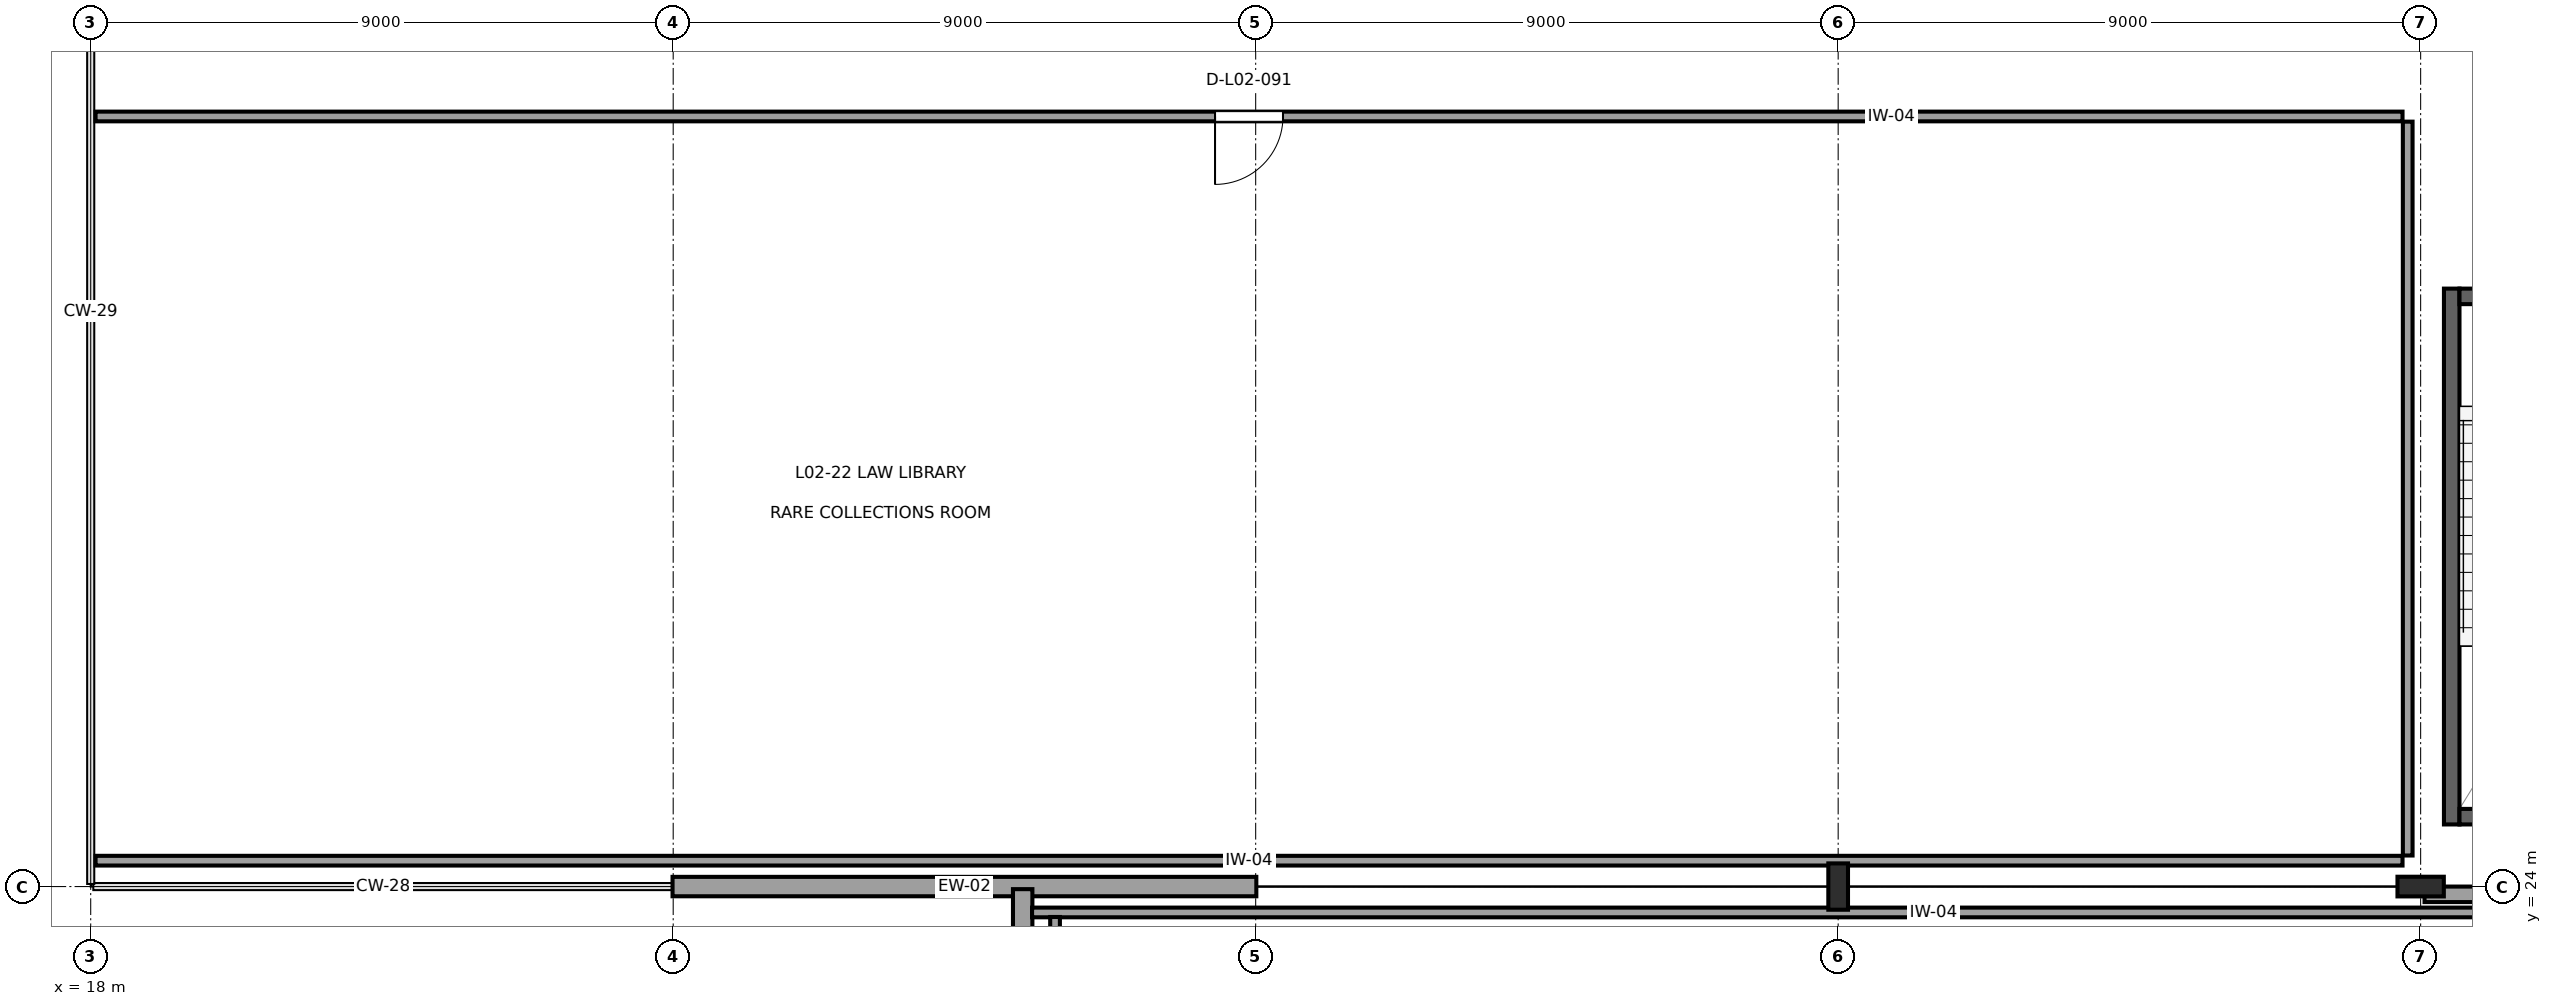
"""IFC4 building model, lengths in metres.
Left out: names, types, materials, properties, quantities, classifications, styles, units other than length and angle.
Written with IfcOpenShell. Run it as: python <this file> out.ifc"""

import sys

from ifc_helpers import new_model, si_unit, direction, frame, frame_2d, origin, origin_2d, place, context, subcontext, project, spatial, rectangle, i_section, extrude, element, fill, save


model = new_model("IFC4")
c1 = context("Model", 3, precision=1e-05, world=origin(), true_north=direction((0.0, 1.0)))
c2 = subcontext(c1, "Body", "Model", "MODEL_VIEW")
j1 = project(units=[si_unit("LENGTHUNIT", "METRE"), si_unit("PLANEANGLEUNIT", "RADIAN")], contexts=[c1])
p1 = place(None, origin())
s1 = spatial("IfcSite", under=j1, at=p1, CompositionType="ELEMENT")
p2 = place(p1, origin())
s2 = spatial("IfcBuilding", under=s1, at=p2, CompositionType="ELEMENT")
p3 = place(p2, frame((0.0, 0.0, 9.9)))
s3 = spatial("IfcBuildingStorey", under=s2, at=p3, CompositionType="ELEMENT", Elevation=9.9)
for number, where, z_axis, x_axis in (
    (1, (45.0, 24.0, 0.0), (0.0, 0.0, 1.0), (1.0, 0.0, 0.0)),
    (2, (54.0, 24.0, 0.0), (0.0, 0.0, 1.0), (0.0, 1.0, 0.0)),
):
    element("IfcColumn", number, at=place(p3, frame(where, z_axis=z_axis, x_axis=x_axis)), inside=s3, PredefinedType="COLUMN", context=c2, shape_type="SweptSolid", body=[
        extrude(i_section(OverallWidth=0.304, OverallDepth=0.716, WebThickness=0.021, FlangeThickness=0.04, at=origin_2d()), origin(), (0.0, 0.0, 1.0), 4.5),
    ])
p4 = place(p3, frame((26.99, 24.0, 0.0), z_axis=(0.0, 0.0, 1.0), x_axis=(1.0, 0.0, 0.0)))
e3 = element("IfcWall", 3, at=p4, inside=s3, PredefinedType="SOLIDWALL", context=c2, shape_type="SweptSolid", body=[
    extrude(rectangle(XDim=9.02, YDim=0.3, at=frame_2d((4.51, 0.0))), origin(), (0.0, 0.0, 1.0), 3.147),
])
p5 = place(p3, frame((32.4, 23.96, 0.0), z_axis=(0.0, 0.0, 1.0), x_axis=(0.0, -1.0, 0.0)))
e4 = element("IfcWall", 4, at=p5, inside=s3, PredefinedType="SOLIDWALL", context=c2, shape_type="SweptSolid", body=[
    extrude(rectangle(XDim=11.97, YDim=0.3, at=frame_2d((5.985, 0.0))), origin(), (0.0, 0.0, 1.0), 3.455),
])
p6 = place(p5, frame((2.941, 0.0, 0.9)))
e5 = element("IfcOpeningElement", 5, at=p6, cuts=e4, PredefinedType="OPENING", context=c2, shape_type="SweptSolid", body=[
    extrude(rectangle(XDim=1.3, YDim=1.3, at=frame_2d((0.65, 0.65))), frame((0.0, 0.165, 0.0), z_axis=(0.0, -1.0, 0.0), x_axis=(1.0, 0.0, 0.0)), (0.0, 0.0, 1.0), 0.33),
])
p7 = place(p5, frame((8.5, 0.0, 0.9)))
e6 = element("IfcOpeningElement", 6, at=p7, cuts=e4, PredefinedType="OPENING", context=c2, shape_type="SweptSolid", body=[
    extrude(rectangle(XDim=1.3, YDim=1.3, at=frame_2d((0.65, 0.65))), frame((0.0, 0.165, 0.0), z_axis=(0.0, -1.0, 0.0), x_axis=(1.0, 0.0, 0.0)), (0.0, 0.0, 1.0), 0.33),
])
p8 = place(p3, frame((54.06, 23.88, 4.28), z_axis=(0.0, 0.0, 1.0), x_axis=(1.0, 0.0, 0.0)))
e7 = element("IfcWall", 7, at=p8, inside=s3, PredefinedType="PARAPET", context=c2, shape_type="SweptSolid", body=[
    extrude(rectangle(XDim=8.88, YDim=0.24, at=frame_2d((4.44, 0.0))), origin(), (0.0, 0.0, 1.0), 0.77),
])
p9 = place(p3, frame((54.48, 24.96, 0.0), z_axis=(0.0, 0.0, 1.0), x_axis=(0.0, 1.0, 0.0)))
e8 = element("IfcWall", 8, at=p9, inside=s3, PredefinedType="SHEAR", context=c2, shape_type="SweptSolid", body=[
    extrude(rectangle(XDim=8.28, YDim=0.24, at=frame_2d((4.14, 0.0))), origin(), (0.0, 0.0, 1.0), 4.31),
])
for number, where, z_axis, x_axis in (
    (9, (54.6, 25.08, 0.0), (0.0, 0.0, 1.0), (1.0, 0.0, 0.0)),
    (10, (54.6, 33.12, 0.0), (0.0, 0.0, 1.0), (1.0, 0.0, 0.0)),
):
    element("IfcWall", number, at=place(p3, frame(where, z_axis=z_axis, x_axis=x_axis)), inside=s3, PredefinedType="SHEAR", context=c2, shape_type="SweptSolid", body=[
        extrude(rectangle(XDim=3.7, YDim=0.24, at=frame_2d((1.85, 0.0))), origin(), (0.0, 0.0, 1.0), 4.31),
    ])
p10 = place(p3, frame((18.075, 35.9, 0.0), z_axis=(0.0, 0.0, 1.0), x_axis=(1.0, 0.0, 0.0)))
e11 = element("IfcWall", 11, at=p10, inside=s3, PredefinedType="PARTITIONING", context=c2, shape_type="SweptSolid", body=[
    extrude(rectangle(XDim=35.645, YDim=0.15, at=frame_2d((17.823, 0.0))), origin(), (0.0, 0.0, 1.0), 4.14),
])
p11 = place(p10, frame((17.297, 0.0, 0.0)))
e12 = element("IfcOpeningElement", 12, at=p11, cuts=e11, PredefinedType="OPENING", context=c2, shape_type="SweptSolid", body=[
    extrude(rectangle(XDim=1.05, YDim=2.25, at=frame_2d((0.525, 1.125))), frame((0.0, 0.09, 0.0), z_axis=(0.0, -1.0, 0.0), x_axis=(1.0, 0.0, 0.0)), (0.0, 0.0, 1.0), 0.18),
])
p12 = place(p3, frame((53.8, 35.82, 0.0), z_axis=(0.0, 0.0, 1.0), x_axis=(0.0, -1.0, 0.0)))
e13 = element("IfcWall", 13, at=p12, inside=s3, PredefinedType="PARTITIONING", context=c2, shape_type="SweptSolid", body=[
    extrude(rectangle(XDim=11.34, YDim=0.15, at=frame_2d((5.67, 0.0))), origin(), (0.0, 0.0, 1.0), 3.355),
])
p13 = place(p3, frame((53.72, 24.4, 0.0), z_axis=(0.0, 0.0, 1.0), x_axis=(-1.0, 0.0, 0.0)))
e14 = element("IfcWall", 14, at=p13, inside=s3, PredefinedType="PARTITIONING", context=c2, shape_type="SweptSolid", body=[
    extrude(rectangle(XDim=35.645, YDim=0.15, at=frame_2d((17.823, 0.0))), origin(), (0.0, 0.0, 1.0), 4.14),
])
p14 = place(p3, frame((32.545, 23.6, 0.0), z_axis=(0.0, 0.0, 1.0), x_axis=(1.0, 0.0, 0.0)))
e15 = element("IfcWall", 15, at=p14, inside=s3, PredefinedType="PARTITIONING", context=c2, shape_type="SweptSolid", body=[
    extrude(rectangle(XDim=39.375, YDim=0.15, at=frame_2d((19.688, 0.0))), origin(), (0.0, 0.0, 1.0), 4.14),
])
p15 = place(p3, frame((32.9, 19.17, 0.0), z_axis=(0.0, 0.0, 1.0), x_axis=(0.0, 1.0, 0.0)))
e16 = element("IfcWall", 16, at=p15, inside=s3, PredefinedType="PARTITIONING", context=c2, shape_type="SweptSolid", body=[
    extrude(rectangle(XDim=4.36, YDim=0.15, at=frame_2d((2.18, 0.0))), origin(), (0.0, 0.0, 1.0), 4.14),
])
p16 = place(p11, frame((1.05, 0.0, 0.0), z_axis=(0.0, 0.0, 1.0), x_axis=(-1.0, 0.0, 0.0)))
e17 = element("IfcDoor", 17, at=p16, inside=s3, OperationType="SINGLE_SWING_LEFT", PredefinedType="DOOR", context=c2, shape_type="SweptSolid", body=[
    extrude(rectangle(XDim=1.05, YDim=2.25, at=frame_2d((0.525, 1.125))), frame((0.0, 0.025, 0.0), z_axis=(0.0, -1.0, 0.0), x_axis=(1.0, 0.0, 0.0)), (0.0, 0.0, 1.0), 0.05),
])
fill(e12, e17)
save(model, sys.argv[1])
